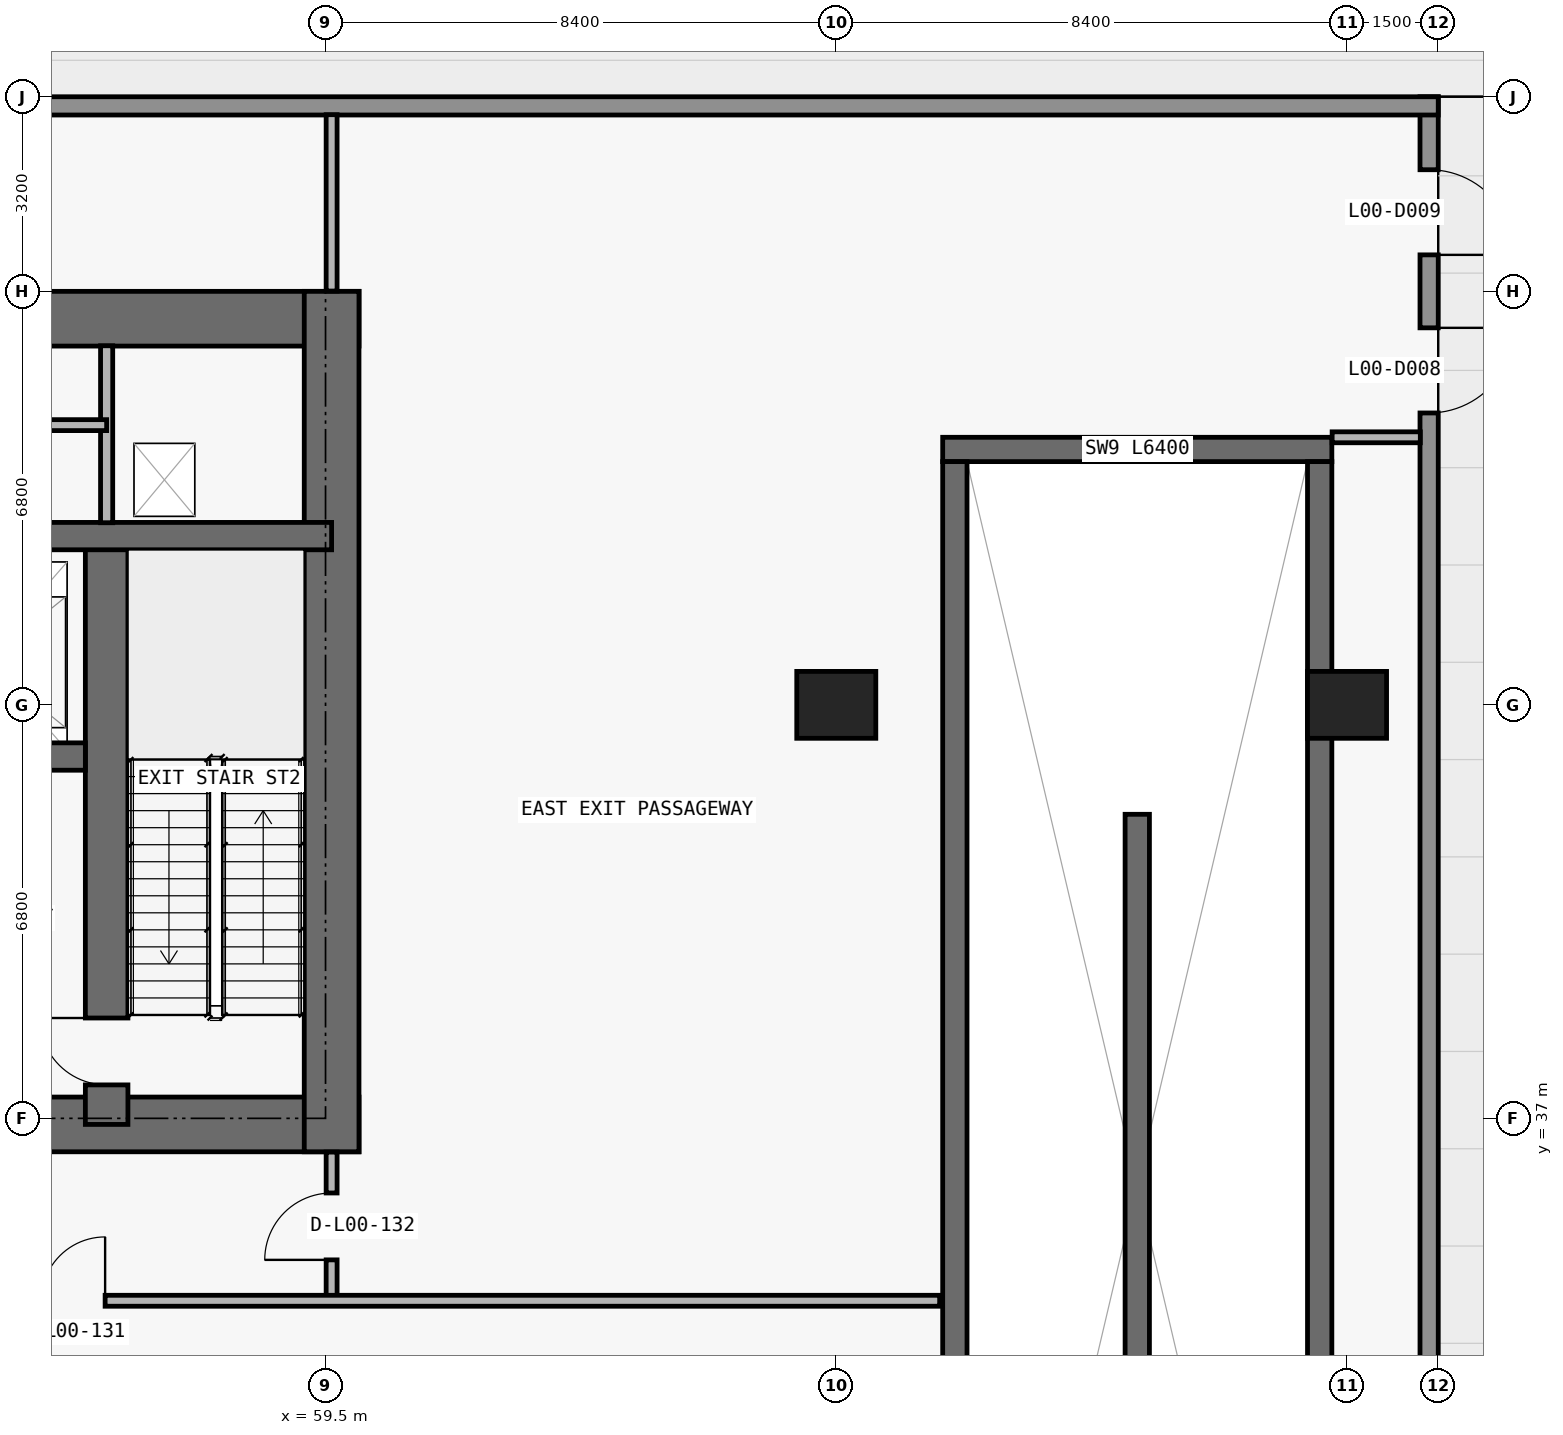
"""IFC4 building model, lengths in metres.
Left out: names, types, materials, properties, quantities, classifications, styles, units other than length and angle.
Written with IfcOpenShell. Run it as: python <this file> out.ifc"""

import sys

from ifc_helpers import new_model, si_unit, direction, frame, frame_2d, origin, origin_2d, place, context, subcontext, project, spatial, rectangle, extrude, element, fill, save


model = new_model("IFC4")
c1 = context("Model", 3, precision=1e-05, world=origin(), true_north=direction((0.0, 1.0)))
c2 = subcontext(c1, "Body", "Model", "MODEL_VIEW")
j1 = project(units=[si_unit("LENGTHUNIT", "METRE"), si_unit("PLANEANGLEUNIT", "RADIAN")], contexts=[c1])
p1 = place(None, origin())
s1 = spatial("IfcSite", under=j1, at=p1, CompositionType="ELEMENT")
p2 = place(p1, origin())
s2 = spatial("IfcBuilding", under=s1, at=p2, CompositionType="ELEMENT")
p3 = place(p2, origin())
s3 = spatial("IfcBuildingStorey", under=s2, at=p3, CompositionType="ELEMENT", Elevation=0.0)
p4 = place(p3, frame((69.65, 48.0, 0.0), z_axis=(0.0, 0.0, 1.0), x_axis=(1.0, 0.0, 0.0)))
e1 = element("IfcWall", 1, at=p4, inside=s3, PredefinedType="SHEAR", context=c2, shape_type="SweptSolid", body=[
    extrude(rectangle(XDim=6.4, YDim=0.4, at=frame_2d((3.2, 0.0))), origin(), (0.0, 0.0, 1.0), 5.1),
])
for number, where, z_axis, x_axis in (
    (2, (69.85, 23.6, 0.0), (0.0, 0.0, 1.0), (0.0, 1.0, 0.0)),
    (3, (75.85, 23.6, 0.0), (0.0, 0.0, 1.0), (0.0, 1.0, 0.0)),
):
    element("IfcWall", number, at=place(p3, frame(where, z_axis=z_axis, x_axis=x_axis)), inside=s3, PredefinedType="SHEAR", context=c2, shape_type="SweptSolid", body=[
        extrude(rectangle(XDim=24.2, YDim=0.4, at=frame_2d((12.1, 0.0))), origin(), (0.0, 0.0, 1.0), 5.1),
    ])
p5 = place(p3, frame((72.85, 23.6, -0.3), z_axis=(0.0, 0.0, 1.0), x_axis=(0.0, 1.0, 0.0)))
e4 = element("IfcWall", 4, at=p5, inside=s3, PredefinedType="SHEAR", context=c2, shape_type="SweptSolid", body=[
    extrude(rectangle(XDim=18.4, YDim=0.4, at=frame_2d((9.2, 0.0))), origin(), (0.0, 0.0, 1.0), 5.4),
])
for number, where, z_axis, x_axis in (
    (5, (67.9, 43.8, 0.0), (0.0, 0.0, 1.0), (1.0, 0.0, 0.0)),
    (6, (76.3, 43.8, 0.0), (0.0, 0.0, 1.0), (1.0, 0.0, 0.0)),
):
    element("IfcColumn", number, at=place(p3, frame(where, z_axis=z_axis, x_axis=x_axis)), inside=s3, PredefinedType="COLUMN", context=c2, shape_type="SweptSolid", body=[
        extrude(rectangle(XDim=1.3, YDim=1.1, at=origin_2d()), origin(), (0.0, 0.0, 1.0), 5.1),
    ])
p6 = place(p3, frame((17.75, 36.9, 0.0), z_axis=(0.0, 0.0, 1.0), x_axis=(1.0, 0.0, 0.0)))
e7 = element("IfcWall", 7, at=p6, inside=s3, PredefinedType="SHEAR", context=c2, shape_type="SweptSolid", body=[
    extrude(rectangle(XDim=42.3, YDim=0.9, at=frame_2d((21.15, 0.0))), origin(), (0.0, 0.0, 1.0), 5.1),
])
p7 = place(p6, frame((14.55, 0.0, 0.0)))
e8 = element("IfcOpeningElement", 8, at=p7, cuts=e7, PredefinedType="OPENING", context=c2, shape_type="SweptSolid", body=[
    extrude(rectangle(XDim=1.1, YDim=2.15, at=frame_2d((0.55, 1.075))), frame((0.0, 0.46, 0.0), z_axis=(0.0, -1.0, 0.0), x_axis=(1.0, 0.0, 0.0)), (0.0, 0.0, 1.0), 0.92),
])
p8 = place(p6, frame((6.4, 0.0, 0.0)))
e9 = element("IfcOpeningElement", 9, at=p8, cuts=e7, PredefinedType="OPENING", context=c2, shape_type="SweptSolid", body=[
    extrude(rectangle(XDim=1.05, YDim=2.15, at=frame_2d((0.525, 1.075))), frame((0.0, 0.46, 0.0), z_axis=(0.0, -1.0, 0.0), x_axis=(1.0, 0.0, 0.0)), (0.0, 0.0, 1.0), 0.92),
])
p9 = place(p6, frame((34.9, 0.0, 0.0)))
e10 = element("IfcOpeningElement", 10, at=p9, cuts=e7, PredefinedType="OPENING", context=c2, shape_type="SweptSolid", body=[
    extrude(rectangle(XDim=1.05, YDim=2.15, at=frame_2d((0.525, 1.075))), frame((0.0, 0.46, 0.0), z_axis=(0.0, -1.0, 0.0), x_axis=(1.0, 0.0, 0.0)), (0.0, 0.0, 1.0), 0.92),
])
p10 = place(p6, frame((11.012, 0.0, 0.0)))
e11 = element("IfcOpeningElement", 11, at=p10, cuts=e7, PredefinedType="OPENING", context=c2, shape_type="SweptSolid", body=[
    extrude(rectangle(XDim=1.05, YDim=2.15, at=frame_2d((0.525, 1.075))), frame((0.0, 0.46, 0.0), z_axis=(0.0, -1.0, 0.0), x_axis=(1.0, 0.0, 0.0)), (0.0, 0.0, 1.0), 0.92),
])
p11 = place(p6, frame((24.25, 0.0, 0.0)))
e12 = element("IfcOpeningElement", 12, at=p11, cuts=e7, PredefinedType="OPENING", context=c2, shape_type="SweptSolid", body=[
    extrude(rectangle(XDim=1.05, YDim=2.15, at=frame_2d((0.525, 1.075))), frame((0.0, 0.46, 0.0), z_axis=(0.0, -1.0, 0.0), x_axis=(1.0, 0.0, 0.0)), (0.0, 0.0, 1.0), 0.92),
])
p12 = place(p3, frame((17.75, 50.15, 0.0), z_axis=(0.0, 0.0, 1.0), x_axis=(1.0, 0.0, 0.0)))
e13 = element("IfcWall", 13, at=p12, inside=s3, PredefinedType="SHEAR", context=c2, shape_type="SweptSolid", body=[
    extrude(rectangle(XDim=42.3, YDim=0.9, at=frame_2d((21.15, 0.0))), origin(), (0.0, 0.0, 1.0), 5.1),
])
p13 = place(p3, frame((59.6, 36.45, 0.0), z_axis=(0.0, 0.0, 1.0), x_axis=(0.0, 1.0, 0.0)))
e14 = element("IfcWall", 14, at=p13, inside=s3, PredefinedType="SHEAR", context=c2, shape_type="SweptSolid", body=[
    extrude(rectangle(XDim=14.15, YDim=0.9, at=frame_2d((7.075, 0.0))), origin(), (0.0, 0.0, 1.0), 5.1),
])
p14 = place(p3, frame((55.9, 36.9, 0.0), z_axis=(0.0, 0.0, 1.0), x_axis=(0.0, 1.0, 0.0)))
e15 = element("IfcWall", 15, at=p14, inside=s3, PredefinedType="SHEAR", context=c2, shape_type="SweptSolid", body=[
    extrude(rectangle(XDim=9.675, YDim=0.7, at=frame_2d((4.837, 0.0))), origin(), (0.0, 0.0, 1.0), 5.1),
])
p15 = place(p14, frame((0.65, 0.0, 0.0)))
e16 = element("IfcOpeningElement", 16, at=p15, cuts=e15, PredefinedType="OPENING", context=c2, shape_type="SweptSolid", body=[
    extrude(rectangle(XDim=1.1, YDim=2.15, at=frame_2d((0.55, 1.075))), frame((0.0, 0.36, 0.0), z_axis=(0.0, -1.0, 0.0), x_axis=(1.0, 0.0, 0.0)), (0.0, 0.0, 1.0), 0.72),
])
p16 = place(p3, frame((22.25, 42.95, 0.0), z_axis=(0.0, 0.0, 1.0), x_axis=(1.0, 0.0, 0.0)))
e17 = element("IfcWall", 17, at=p16, inside=s3, PredefinedType="SHEAR", context=c2, shape_type="SweptSolid", body=[
    extrude(rectangle(XDim=33.3, YDim=0.45, at=frame_2d((16.65, 0.0))), origin(), (0.0, 0.0, 1.0), 5.1),
])
p17 = place(p16, frame((1.05, 0.0, 0.0)))
e18 = element("IfcOpeningElement", 18, at=p17, cuts=e17, PredefinedType="OPENING", context=c2, shape_type="SweptSolid", body=[
    extrude(rectangle(XDim=1.2, YDim=2.2, at=frame_2d((0.6, 1.1))), frame((0.0, 0.235, 0.0), z_axis=(0.0, -1.0, 0.0), x_axis=(1.0, 0.0, 0.0)), (0.0, 0.0, 1.0), 0.47),
])
p18 = place(p16, frame((31.05, 0.0, 0.0)))
e19 = element("IfcOpeningElement", 19, at=p18, cuts=e17, PredefinedType="OPENING", context=c2, shape_type="SweptSolid", body=[
    extrude(rectangle(XDim=1.2, YDim=2.2, at=frame_2d((0.6, 1.1))), frame((0.0, 0.235, 0.0), z_axis=(0.0, -1.0, 0.0), x_axis=(1.0, 0.0, 0.0)), (0.0, 0.0, 1.0), 0.47),
])
p19 = place(p16, frame((13.5, 0.0, 0.0)))
e20 = element("IfcOpeningElement", 20, at=p19, cuts=e17, PredefinedType="OPENING", context=c2, shape_type="SweptSolid", body=[
    extrude(rectangle(XDim=1.1, YDim=2.2, at=frame_2d((0.55, 1.1))), frame((0.0, 0.235, 0.0), z_axis=(0.0, -1.0, 0.0), x_axis=(1.0, 0.0, 0.0)), (0.0, 0.0, 1.0), 0.47),
])
p20 = place(p16, frame((16.1, 0.0, 0.0)))
e21 = element("IfcOpeningElement", 21, at=p20, cuts=e17, PredefinedType="OPENING", context=c2, shape_type="SweptSolid", body=[
    extrude(rectangle(XDim=1.1, YDim=2.2, at=frame_2d((0.55, 1.1))), frame((0.0, 0.235, 0.0), z_axis=(0.0, -1.0, 0.0), x_axis=(1.0, 0.0, 0.0)), (0.0, 0.0, 1.0), 0.47),
])
p21 = place(p16, frame((18.7, 0.0, 0.0)))
e22 = element("IfcOpeningElement", 22, at=p21, cuts=e17, PredefinedType="OPENING", context=c2, shape_type="SweptSolid", body=[
    extrude(rectangle(XDim=1.1, YDim=2.2, at=frame_2d((0.55, 1.1))), frame((0.0, 0.235, 0.0), z_axis=(0.0, -1.0, 0.0), x_axis=(1.0, 0.0, 0.0)), (0.0, 0.0, 1.0), 0.47),
])
p22 = place(p16, frame((21.4, 0.0, 0.0)))
e23 = element("IfcOpeningElement", 23, at=p22, cuts=e17, PredefinedType="OPENING", context=c2, shape_type="SweptSolid", body=[
    extrude(rectangle(XDim=1.1, YDim=2.2, at=frame_2d((0.55, 1.1))), frame((0.0, 0.235, 0.0), z_axis=(0.0, -1.0, 0.0), x_axis=(1.0, 0.0, 0.0)), (0.0, 0.0, 1.0), 0.47),
])
p23 = place(p16, frame((24.0, 0.0, 0.0)))
e24 = element("IfcOpeningElement", 24, at=p23, cuts=e17, PredefinedType="OPENING", context=c2, shape_type="SweptSolid", body=[
    extrude(rectangle(XDim=1.1, YDim=2.2, at=frame_2d((0.55, 1.1))), frame((0.0, 0.235, 0.0), z_axis=(0.0, -1.0, 0.0), x_axis=(1.0, 0.0, 0.0)), (0.0, 0.0, 1.0), 0.47),
])
p24 = place(p16, frame((26.45, 0.0, 0.0)))
e25 = element("IfcOpeningElement", 25, at=p24, cuts=e17, PredefinedType="OPENING", context=c2, shape_type="SweptSolid", body=[
    extrude(rectangle(XDim=1.1, YDim=2.2, at=frame_2d((0.55, 1.1))), frame((0.0, 0.235, 0.0), z_axis=(0.0, -1.0, 0.0), x_axis=(1.0, 0.0, 0.0)), (0.0, 0.0, 1.0), 0.47),
])
p25 = place(p16, frame((5.95, 0.0, 0.0)))
e26 = element("IfcOpeningElement", 26, at=p25, cuts=e17, PredefinedType="OPENING", context=c2, shape_type="SweptSolid", body=[
    extrude(rectangle(XDim=1.1, YDim=2.2, at=frame_2d((0.55, 1.1))), frame((0.0, 0.235, 0.0), z_axis=(0.0, -1.0, 0.0), x_axis=(1.0, 0.0, 0.0)), (0.0, 0.0, 1.0), 0.47),
])
p26 = place(p16, frame((3.625, 0.0, 0.0)))
e27 = element("IfcOpeningElement", 27, at=p26, cuts=e17, PredefinedType="OPENING", context=c2, shape_type="SweptSolid", body=[
    extrude(rectangle(XDim=1.05, YDim=2.15, at=frame_2d((0.525, 1.075))), frame((0.0, 0.235, 0.0), z_axis=(0.0, -1.0, 0.0), x_axis=(1.0, 0.0, 0.0)), (0.0, 0.0, 1.0), 0.47),
])
p27 = place(p16, frame((28.675, 0.0, 0.0)))
e28 = element("IfcOpeningElement", 28, at=p27, cuts=e17, PredefinedType="OPENING", context=c2, shape_type="SweptSolid", body=[
    extrude(rectangle(XDim=1.05, YDim=2.15, at=frame_2d((0.525, 1.075))), frame((0.0, 0.235, 0.0), z_axis=(0.0, -1.0, 0.0), x_axis=(1.0, 0.0, 0.0)), (0.0, 0.0, 1.0), 0.47),
])
p28 = place(p3, frame((18.2, 46.575, 0.0), z_axis=(0.0, 0.0, 1.0), x_axis=(1.0, 0.0, 0.0)))
e29 = element("IfcWall", 29, at=p28, inside=s3, PredefinedType="SHEAR", context=c2, shape_type="SweptSolid", body=[
    extrude(rectangle(XDim=41.4, YDim=0.45, at=frame_2d((20.7, 0.0))), origin(), (0.0, 0.0, 1.0), 5.1),
])
p29 = place(p28, frame((7.675, 0.0, 0.0)))
e30 = element("IfcOpeningElement", 30, at=p29, cuts=e29, PredefinedType="OPENING", context=c2, shape_type="SweptSolid", body=[
    extrude(rectangle(XDim=1.05, YDim=2.15, at=frame_2d((0.525, 1.075))), frame((0.0, 0.235, 0.0), z_axis=(0.0, -1.0, 0.0), x_axis=(1.0, 0.0, 0.0)), (0.0, 0.0, 1.0), 0.47),
])
p30 = place(p28, frame((32.725, 0.0, 0.0)))
e31 = element("IfcOpeningElement", 31, at=p30, cuts=e29, PredefinedType="OPENING", context=c2, shape_type="SweptSolid", body=[
    extrude(rectangle(XDim=1.05, YDim=2.15, at=frame_2d((0.525, 1.075))), frame((0.0, 0.235, 0.0), z_axis=(0.0, -1.0, 0.0), x_axis=(1.0, 0.0, 0.0)), (0.0, 0.0, 1.0), 0.47),
])
p31 = place(p3, frame((77.65, 53.8, 0.0), z_axis=(0.0, 0.0, 1.0), x_axis=(0.0, -1.0, 0.0)))
e32 = element("IfcWall", 32, at=p31, inside=s3, PredefinedType="STANDARD", context=c2, shape_type="SweptSolid", body=[
    extrude(rectangle(XDim=53.8, YDim=0.3, at=frame_2d((26.9, 0.0))), origin(), (0.0, 0.0, 1.0), 5.1),
])
p32 = place(p31, frame((3.8, 0.0, 0.0)))
e33 = element("IfcOpeningElement", 33, at=p32, cuts=e32, PredefinedType="OPENING", context=c2, shape_type="SweptSolid", body=[
    extrude(rectangle(XDim=1.4, YDim=2.2, at=frame_2d((0.7, 1.1))), frame((0.0, 0.16, 0.0), z_axis=(0.0, -1.0, 0.0), x_axis=(1.0, 0.0, 0.0)), (0.0, 0.0, 1.0), 0.32),
])
p33 = place(p31, frame((1.2, 0.0, 0.0)))
e34 = element("IfcOpeningElement", 34, at=p33, cuts=e32, PredefinedType="OPENING", context=c2, shape_type="SweptSolid", body=[
    extrude(rectangle(XDim=1.4, YDim=2.2, at=frame_2d((0.7, 1.1))), frame((0.0, 0.16, 0.0), z_axis=(0.0, -1.0, 0.0), x_axis=(1.0, 0.0, 0.0)), (0.0, 0.0, 1.0), 0.32),
])
p34 = place(p31, frame((30.4, 0.0, 0.0)))
e35 = element("IfcOpeningElement", 35, at=p34, cuts=e32, PredefinedType="OPENING", context=c2, shape_type="SweptSolid", body=[
    extrude(rectangle(XDim=5.4, YDim=3.2, at=frame_2d((2.7, 1.6))), frame((0.0, 0.16, 0.0), z_axis=(0.0, -1.0, 0.0), x_axis=(1.0, 0.0, 0.0)), (0.0, 0.0, 1.0), 0.32),
])
p35 = place(p3, frame((0.0, 53.65, 0.0), z_axis=(0.0, 0.0, 1.0), x_axis=(1.0, 0.0, 0.0)))
e36 = element("IfcWall", 36, at=p35, inside=s3, PredefinedType="STANDARD", context=c2, shape_type="SweptSolid", body=[
    extrude(rectangle(XDim=77.8, YDim=0.3, at=frame_2d((38.9, 0.0))), origin(), (0.0, 0.0, 1.0), 5.1),
])
p36 = place(p3, frame((55.9, 46.795, 0.0), z_axis=(0.0, 0.0, 1.0), x_axis=(0.0, 1.0, 0.0)))
e37 = element("IfcWall", 37, at=p36, inside=s3, PredefinedType="PARTITIONING", context=c2, shape_type="SweptSolid", body=[
    extrude(rectangle(XDim=2.91, YDim=0.2, at=frame_2d((1.455, 0.0))), origin(), (0.0, 0.0, 1.0), 5.1),
])
p37 = place(p3, frame((59.6, 34.0, 0.0), z_axis=(0.0, 0.0, 1.0), x_axis=(0.0, 1.0, 0.0)))
e38 = element("IfcWall", 38, at=p37, inside=s3, PredefinedType="PARTITIONING", context=c2, shape_type="SweptSolid", body=[
    extrude(rectangle(XDim=2.445, YDim=0.18, at=frame_2d((1.223, 0.0))), origin(), (0.0, 0.0, 1.0), 5.1),
])
p38 = place(p37, frame((0.673, 0.0, 0.0)))
e39 = element("IfcOpeningElement", 39, at=p38, cuts=e38, PredefinedType="OPENING", context=c2, shape_type="SweptSolid", body=[
    extrude(rectangle(XDim=1.1, YDim=2.15, at=frame_2d((0.55, 1.075))), frame((0.0, 0.1, 0.0), z_axis=(0.0, -1.0, 0.0), x_axis=(1.0, 0.0, 0.0)), (0.0, 0.0, 1.0), 0.2),
])
p39 = place(p3, frame((59.6, 50.605, 0.0), z_axis=(0.0, 0.0, 1.0), x_axis=(0.0, 1.0, 0.0)))
e40 = element("IfcWall", 40, at=p39, inside=s3, PredefinedType="PARTITIONING", context=c2, shape_type="SweptSolid", body=[
    extrude(rectangle(XDim=2.9, YDim=0.18, at=frame_2d((1.45, 0.0))), origin(), (0.0, 0.0, 1.0), 5.1),
])
p40 = place(p3, frame((0.295, 34.0, 0.0), z_axis=(0.0, 0.0, 1.0), x_axis=(1.0, 0.0, 0.0)))
e41 = element("IfcWall", 41, at=p40, inside=s3, PredefinedType="PARTITIONING", context=c2, shape_type="SweptSolid", body=[
    extrude(rectangle(XDim=69.305, YDim=0.18, at=frame_2d((34.653, 0.0))), origin(), (0.0, 0.0, 1.0), 5.1),
])
p41 = place(p40, frame((38.13, 0.0, 0.0)))
e42 = element("IfcOpeningElement", 42, at=p41, cuts=e41, PredefinedType="OPENING", context=c2, shape_type="SweptSolid", body=[
    extrude(rectangle(XDim=1.05, YDim=2.15, at=frame_2d((0.525, 1.075))), frame((0.0, 0.1, 0.0), z_axis=(0.0, -1.0, 0.0), x_axis=(1.0, 0.0, 0.0)), (0.0, 0.0, 1.0), 0.2),
])
p42 = place(p40, frame((12.752, 0.0, 0.0)))
e43 = element("IfcOpeningElement", 43, at=p42, cuts=e41, PredefinedType="OPENING", context=c2, shape_type="SweptSolid", body=[
    extrude(rectangle(XDim=0.9, YDim=2.15, at=frame_2d((0.45, 1.075))), frame((0.0, 0.1, 0.0), z_axis=(0.0, -1.0, 0.0), x_axis=(1.0, 0.0, 0.0)), (0.0, 0.0, 1.0), 0.2),
])
p43 = place(p40, frame((54.53, 0.0, 0.0)))
e44 = element("IfcOpeningElement", 44, at=p43, cuts=e41, PredefinedType="OPENING", context=c2, shape_type="SweptSolid", body=[
    extrude(rectangle(XDim=1.05, YDim=2.15, at=frame_2d((0.525, 1.075))), frame((0.0, 0.1, 0.0), z_axis=(0.0, -1.0, 0.0), x_axis=(1.0, 0.0, 0.0)), (0.0, 0.0, 1.0), 0.2),
])
p44 = place(p3, frame((76.055, 48.2, 0.0), z_axis=(0.0, 0.0, 1.0), x_axis=(1.0, 0.0, 0.0)))
e45 = element("IfcWall", 45, at=p44, inside=s3, PredefinedType="PARTITIONING", context=c2, shape_type="SweptSolid", body=[
    extrude(rectangle(XDim=1.45, YDim=0.18, at=frame_2d((0.725, 0.0))), origin(), (0.0, 0.0, 1.0), 5.1),
])
p45 = place(p3, frame((21.9, 48.4, 0.0), z_axis=(0.0, 0.0, 1.0), x_axis=(1.0, 0.0, 0.0)))
e46 = element("IfcWall", 46, at=p45, inside=s3, PredefinedType="PARTITIONING", context=c2, shape_type="SweptSolid", body=[
    extrude(rectangle(XDim=34.0, YDim=0.18, at=frame_2d((17.0, 0.0))), origin(), (0.0, 0.0, 1.0), 5.1),
])
p46 = place(p45, frame((8.0, 0.0, 0.0)))
e47 = element("IfcOpeningElement", 47, at=p46, cuts=e46, PredefinedType="OPENING", context=c2, shape_type="SweptSolid", body=[
    extrude(rectangle(XDim=1.0, YDim=2.2, at=frame_2d((0.5, 1.1))), frame((0.0, 0.1, 0.0), z_axis=(0.0, -1.0, 0.0), x_axis=(1.0, 0.0, 0.0)), (0.0, 0.0, 1.0), 0.2),
])
p47 = place(p45, frame((25.0, 0.0, 0.0)))
e48 = element("IfcOpeningElement", 48, at=p47, cuts=e46, PredefinedType="OPENING", context=c2, shape_type="SweptSolid", body=[
    extrude(rectangle(XDim=1.0, YDim=2.2, at=frame_2d((0.5, 1.1))), frame((0.0, 0.1, 0.0), z_axis=(0.0, -1.0, 0.0), x_axis=(1.0, 0.0, 0.0)), (0.0, 0.0, 1.0), 0.2),
])
p48 = place(p32, origin())
e49 = element("IfcDoor", 49, at=p48, inside=s3, OperationType="SINGLE_SWING_LEFT", PredefinedType="DOOR", context=c2, shape_type="SweptSolid", body=[
    extrude(rectangle(XDim=1.4, YDim=2.2, at=frame_2d((0.7, 1.1))), frame((0.0, 0.025, 0.0), z_axis=(0.0, -1.0, 0.0), x_axis=(1.0, 0.0, 0.0)), (0.0, 0.0, 1.0), 0.05),
])
fill(e33, e49)
p49 = place(p33, origin())
e50 = element("IfcDoor", 50, at=p49, inside=s3, OperationType="SINGLE_SWING_RIGHT", PredefinedType="DOOR", context=c2, shape_type="SweptSolid", body=[
    extrude(rectangle(XDim=1.4, YDim=2.2, at=frame_2d((0.7, 1.1))), frame((0.0, 0.025, 0.0), z_axis=(0.0, -1.0, 0.0), x_axis=(1.0, 0.0, 0.0)), (0.0, 0.0, 1.0), 0.05),
])
fill(e34, e50)
p50 = place(p15, origin())
e51 = element("IfcDoor", 51, at=p50, inside=s3, OperationType="SINGLE_SWING_RIGHT", PredefinedType="DOOR", context=c2, shape_type="SweptSolid", body=[
    extrude(rectangle(XDim=1.1, YDim=2.15, at=frame_2d((0.55, 1.075))), frame((0.0, 0.025, 0.0), z_axis=(0.0, -1.0, 0.0), x_axis=(1.0, 0.0, 0.0)), (0.0, 0.0, 1.0), 0.05),
])
fill(e16, e51)
p51 = place(p43, origin())
e52 = element("IfcDoor", 52, at=p51, inside=s3, OperationType="SINGLE_SWING_RIGHT", PredefinedType="DOOR", context=c2, shape_type="SweptSolid", body=[
    extrude(rectangle(XDim=1.05, YDim=2.15, at=frame_2d((0.525, 1.075))), frame((0.0, 0.025, 0.0), z_axis=(0.0, -1.0, 0.0), x_axis=(1.0, 0.0, 0.0)), (0.0, 0.0, 1.0), 0.05),
])
fill(e44, e52)
p52 = place(p38, origin())
e53 = element("IfcDoor", 53, at=p52, inside=s3, OperationType="SINGLE_SWING_LEFT", PredefinedType="DOOR", context=c2, shape_type="SweptSolid", body=[
    extrude(rectangle(XDim=1.1, YDim=2.15, at=frame_2d((0.55, 1.075))), frame((0.0, 0.025, 0.0), z_axis=(0.0, -1.0, 0.0), x_axis=(1.0, 0.0, 0.0)), (0.0, 0.0, 1.0), 0.05),
])
fill(e39, e53)
save(model, sys.argv[1])
